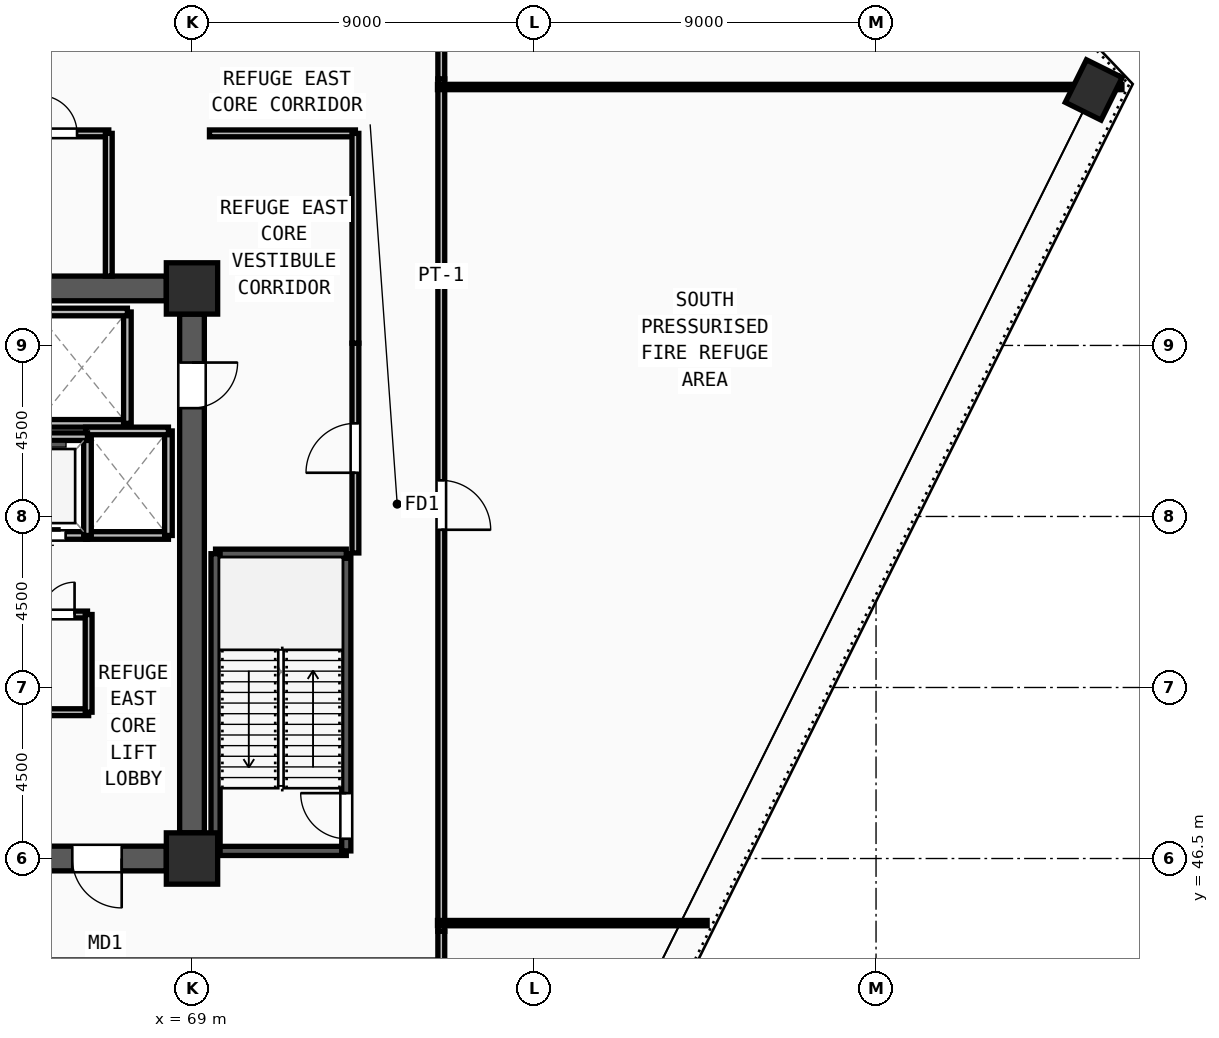
"""IFC4 building model, lengths in metres.
Left out: names, types, materials, properties, quantities, classifications, styles, units other than length and angle.
Written with IfcOpenShell. Run it as: python <this file> out.ifc"""

import sys

from ifc_helpers import new_model, si_unit, direction, frame, frame_2d, origin, origin_2d, place, context, subcontext, project, spatial, rectangle, extrude, source, transform, mapped, element, fill, save


model = new_model("IFC4")
c1 = context("Model", 3, precision=1e-05, world=origin(), true_north=direction((0.0, 1.0)))
c2 = subcontext(c1, "Body", "Model", "MODEL_VIEW")
j1 = project(units=[si_unit("LENGTHUNIT", "METRE"), si_unit("PLANEANGLEUNIT", "RADIAN")], contexts=[c1])
p1 = place(None, origin())
s1 = spatial("IfcSite", under=j1, at=p1, CompositionType="ELEMENT")
p2 = place(p1, origin())
s2 = spatial("IfcBuilding", under=s1, at=p2, CompositionType="ELEMENT")
p3 = place(p2, frame((0.0, 0.0, 231.75)))
s3 = spatial("IfcBuildingStorey", under=s2, at=p3, CompositionType="ELEMENT", Elevation=231.75)
m1 = source(origin(), c2, "Body", "SweptSolid", [
    extrude(rectangle(XDim=1.35, YDim=1.35, at=origin_2d()), origin(), (0.0, 0.0, 1.0), 4.5),
])
for number, where, z_axis, x_axis in (
    (1, (69.0, 46.5, 0.0), (0.0, 0.0, 1.0), (1.0, 0.0, 0.0)),
    (2, (69.0, 61.5, 0.0), (0.0, 0.0, 1.0), (1.0, 0.0, 0.0)),
):
    element("IfcColumn", number, at=place(p3, frame(where, z_axis=z_axis, x_axis=x_axis)), inside=s3, PredefinedType="COLUMN", context=c2, shape_type="MappedRepresentation", body=[
        mapped(m1, transform((0.0, 0.0, 0.0), x_axis=(1.0, 0.0, 0.0), y_axis=(0.0, 1.0, 0.0), z_axis=(0.0, 0.0, 1.0), scale=1.0)),
    ])
m2 = source(origin(), c2, "Body", "SweptSolid", [
    extrude(rectangle(XDim=1.25, YDim=1.05, at=origin_2d()), origin(), (0.0, 0.0, 1.0), 4.5),
])
p4 = place(p3, frame((92.729, 66.723, 0.0), z_axis=(0.0, 0.0, 1.0), x_axis=(0.44447884122, 0.895789350075, 0.0)))
e3 = element("IfcColumn", 3, at=p4, inside=s3, PredefinedType="COLUMN", context=c2, shape_type="MappedRepresentation", body=[
    mapped(m2, transform((0.0, 0.0, 0.0), x_axis=(1.0, 0.0, 0.0), y_axis=(0.0, 1.0, 0.0), z_axis=(0.0, 0.0, 1.0), scale=1.0)),
])
p5 = place(p3, frame((60.675, 61.5, 0.0), z_axis=(0.0, 0.0, 1.0), x_axis=(1.0, 0.0, 0.0)))
e4 = element("IfcWall", 4, at=p5, inside=s3, PredefinedType="SHEAR", context=c2, shape_type="SweptSolid", body=[
    extrude(rectangle(XDim=7.65, YDim=0.65, at=frame_2d((3.825, 0.0))), origin(), (0.0, 0.0, 1.0), 4.32),
])
p6 = place(p3, frame((69.0, 60.825, 0.0), z_axis=(0.0, 0.0, 1.0), x_axis=(0.0, -1.0, 0.0)))
e5 = element("IfcWall", 5, at=p6, inside=s3, PredefinedType="SHEAR", context=c2, shape_type="SweptSolid", body=[
    extrude(rectangle(XDim=13.65, YDim=0.65, at=frame_2d((6.825, 0.0))), origin(), (0.0, 0.0, 1.0), 4.32),
])
m3 = source(origin(), c2, "Body", "SweptSolid", [
    extrude(rectangle(XDim=1.2, YDim=2.2, at=frame_2d((0.6, 1.1))), frame((0.0, 0.335, 0.0), z_axis=(0.0, -1.0, 0.0), x_axis=(1.0, 0.0, 0.0)), (0.0, 0.0, 1.0), 0.67),
])
p7 = place(p6, frame((1.275, 0.0, 0.0)))
e6 = element("IfcOpeningElement", 6, at=p7, cuts=e5, PredefinedType="OPENING", context=c2, shape_type="MappedRepresentation", body=[
    mapped(m3, transform((0.0, 0.0, 0.0), x_axis=(1.0, 0.0, 0.0), y_axis=(0.0, 1.0, 0.0), z_axis=(0.0, 0.0, 1.0), scale=1.0)),
])
p8 = place(p3, frame((68.325, 46.5, 0.0), z_axis=(0.0, 0.0, 1.0), x_axis=(-1.0, 0.0, 0.0)))
e7 = element("IfcWall", 7, at=p8, inside=s3, PredefinedType="SHEAR", context=c2, shape_type="SweptSolid", body=[
    extrude(rectangle(XDim=7.65, YDim=0.65, at=frame_2d((3.825, 0.0))), origin(), (0.0, 0.0, 1.0), 4.32),
])
m4 = source(origin(), c2, "Body", "SweptSolid", [
    extrude(rectangle(XDim=1.3, YDim=2.2, at=frame_2d((0.65, 1.1))), frame((0.0, 0.335, 0.0), z_axis=(0.0, -1.0, 0.0), x_axis=(1.0, 0.0, 0.0)), (0.0, 0.0, 1.0), 0.67),
])
p9 = place(p8, frame((1.175, 0.0, 0.0)))
e8 = element("IfcOpeningElement", 8, at=p9, cuts=e7, PredefinedType="OPENING", context=c2, shape_type="MappedRepresentation", body=[
    mapped(m4, transform((0.0, 0.0, 0.0), x_axis=(1.0, 0.0, 0.0), y_axis=(0.0, 1.0, 0.0), z_axis=(0.0, 0.0, 1.0), scale=1.0)),
])
p10 = place(p3, frame((69.62, 46.7, 0.0), z_axis=(0.0, 0.0, 1.0), x_axis=(1.0, 0.0, 0.0)))
e9 = element("IfcWall", 9, at=p10, inside=s3, PredefinedType="SOLIDWALL", context=c2, shape_type="SweptSolid", body=[
    extrude(rectangle(XDim=3.44, YDim=0.24, at=frame_2d((1.72, 0.0))), origin(), (0.0, 0.0, 1.0), 4.32),
])
p11 = place(p3, frame((73.06, 46.7, 0.0), z_axis=(0.0, 0.0, 1.0), x_axis=(0.0, 1.0, 0.0)))
e10 = element("IfcWall", 10, at=p11, inside=s3, PredefinedType="SOLIDWALL", context=c2, shape_type="SweptSolid", body=[
    extrude(rectangle(XDim=7.82, YDim=0.24, at=frame_2d((3.91, 0.0))), origin(), (0.0, 0.0, 1.0), 4.32),
])
m5 = source(origin(), c2, "Body", "SweptSolid", [
    extrude(rectangle(XDim=1.2, YDim=2.2, at=frame_2d((0.6, 1.1))), frame((0.0, 0.13, 0.0), z_axis=(0.0, -1.0, 0.0), x_axis=(1.0, 0.0, 0.0)), (0.0, 0.0, 1.0), 0.26),
])
p12 = place(p11, frame((0.32, 0.0, 0.0)))
e11 = element("IfcOpeningElement", 11, at=p12, cuts=e10, PredefinedType="OPENING", context=c2, shape_type="MappedRepresentation", body=[
    mapped(m5, transform((0.0, 0.0, 0.0), x_axis=(1.0, 0.0, 0.0), y_axis=(0.0, 1.0, 0.0), z_axis=(0.0, 0.0, 1.0), scale=1.0)),
])
p13 = place(p3, frame((73.06, 54.52, 0.0), z_axis=(0.0, 0.0, 1.0), x_axis=(-1.0, 0.0, 0.0)))
e12 = element("IfcWall", 12, at=p13, inside=s3, PredefinedType="SOLIDWALL", context=c2, shape_type="SweptSolid", body=[
    extrude(rectangle(XDim=3.44, YDim=0.24, at=frame_2d((1.72, 0.0))), origin(), (0.0, 0.0, 1.0), 4.32),
])
p14 = place(p3, frame((69.62, 54.52, 0.0), z_axis=(0.0, 0.0, 1.0), x_axis=(0.0, -1.0, 0.0)))
e13 = element("IfcWall", 13, at=p14, inside=s3, PredefinedType="SOLIDWALL", context=c2, shape_type="SweptSolid", body=[
    extrude(rectangle(XDim=7.82, YDim=0.24, at=frame_2d((3.91, 0.0))), origin(), (0.0, 0.0, 1.0), 4.32),
])
p15 = place(p3, frame((64.9, 57.95, 0.0), z_axis=(0.0, 0.0, 1.0), x_axis=(1.0, 0.0, 0.0)))
e14 = element("IfcWall", 14, at=p15, inside=s3, PredefinedType="SOLIDWALL", context=c2, shape_type="SweptSolid", body=[
    extrude(rectangle(XDim=2.4, YDim=0.2, at=frame_2d((1.2, 0.0))), origin(), (0.0, 0.0, 1.0), 4.32),
])
p16 = place(p3, frame((67.3, 57.95, 0.0), z_axis=(0.0, 0.0, 1.0), x_axis=(0.0, 1.0, 0.0)))
e15 = element("IfcWall", 15, at=p16, inside=s3, PredefinedType="SOLIDWALL", context=c2, shape_type="SweptSolid", body=[
    extrude(rectangle(XDim=2.93, YDim=0.2, at=frame_2d((1.465, 0.0))), origin(), (0.0, 0.0, 1.0), 4.32),
])
p17 = place(p3, frame((67.3, 60.88, 0.0), z_axis=(0.0, 0.0, 1.0), x_axis=(-1.0, 0.0, 0.0)))
e16 = element("IfcWall", 16, at=p17, inside=s3, PredefinedType="SOLIDWALL", context=c2, shape_type="SweptSolid", body=[
    extrude(rectangle(XDim=2.4, YDim=0.2, at=frame_2d((1.2, 0.0))), origin(), (0.0, 0.0, 1.0), 4.32),
])
p18 = place(p3, frame((66.2, 55.0, 0.0), z_axis=(0.0, 0.0, 1.0), x_axis=(1.0, 0.0, 0.0)))
e17 = element("IfcWall", 17, at=p18, inside=s3, PredefinedType="SOLIDWALL", context=c2, shape_type="SweptSolid", body=[
    extrude(rectangle(XDim=2.18, YDim=0.2, at=frame_2d((1.09, 0.0))), origin(), (0.0, 0.0, 1.0), 4.32),
])
p19 = place(p3, frame((68.38, 55.0, 0.0), z_axis=(0.0, 0.0, 1.0), x_axis=(0.0, 1.0, 0.0)))
e18 = element("IfcWall", 18, at=p19, inside=s3, PredefinedType="SOLIDWALL", context=c2, shape_type="SweptSolid", body=[
    extrude(rectangle(XDim=2.75, YDim=0.2, at=frame_2d((1.375, 0.0))), origin(), (0.0, 0.0, 1.0), 4.32),
])
p20 = place(p3, frame((68.38, 57.75, 0.0), z_axis=(0.0, 0.0, 1.0), x_axis=(-1.0, 0.0, 0.0)))
e19 = element("IfcWall", 19, at=p20, inside=s3, PredefinedType="SOLIDWALL", context=c2, shape_type="SweptSolid", body=[
    extrude(rectangle(XDim=2.18, YDim=0.2, at=frame_2d((1.09, 0.0))), origin(), (0.0, 0.0, 1.0), 4.32),
])
p21 = place(p3, frame((64.0, 55.0, 0.0), z_axis=(0.0, 0.0, 1.0), x_axis=(1.0, 0.0, 0.0)))
e20 = element("IfcWall", 20, at=p21, inside=s3, PredefinedType="SOLIDWALL", context=c2, shape_type="SweptSolid", body=[
    extrude(rectangle(XDim=2.25, YDim=0.2, at=frame_2d((1.125, 0.0))), origin(), (0.0, 0.0, 1.0), 4.32),
])
m6 = source(origin(), c2, "Body", "SweptSolid", [
    extrude(rectangle(XDim=1.1, YDim=2.2, at=frame_2d((0.55, 1.1))), frame((0.0, 0.11, 0.0), z_axis=(0.0, -1.0, 0.0), x_axis=(1.0, 0.0, 0.0)), (0.0, 0.0, 1.0), 0.22),
])
p22 = place(p21, frame((0.575, 0.0, 0.0)))
e21 = element("IfcOpeningElement", 21, at=p22, cuts=e20, PredefinedType="OPENING", context=c2, shape_type="MappedRepresentation", body=[
    mapped(m6, transform((0.0, 0.0, 0.0), x_axis=(1.0, 0.0, 0.0), y_axis=(0.0, 1.0, 0.0), z_axis=(0.0, 0.0, 1.0), scale=1.0)),
])
p23 = place(p3, frame((66.25, 55.0, 0.0), z_axis=(0.0, 0.0, 1.0), x_axis=(0.0, 1.0, 0.0)))
e22 = element("IfcWall", 22, at=p23, inside=s3, PredefinedType="SOLIDWALL", context=c2, shape_type="SweptSolid", body=[
    extrude(rectangle(XDim=2.6, YDim=0.2, at=frame_2d((1.3, 0.0))), origin(), (0.0, 0.0, 1.0), 4.32),
])
p24 = place(p3, frame((66.25, 57.6, 0.0), z_axis=(0.0, 0.0, 1.0), x_axis=(-1.0, 0.0, 0.0)))
e23 = element("IfcWall", 23, at=p24, inside=s3, PredefinedType="SOLIDWALL", context=c2, shape_type="SweptSolid", body=[
    extrude(rectangle(XDim=2.25, YDim=0.2, at=frame_2d((1.125, 0.0))), origin(), (0.0, 0.0, 1.0), 4.32),
])
p25 = place(p3, frame((64.72, 52.92, 0.0), z_axis=(0.0, 0.0, 1.0), x_axis=(1.0, 0.0, 0.0)))
e24 = element("IfcWall", 24, at=p25, inside=s3, PredefinedType="PARTITIONING", context=c2, shape_type="SweptSolid", body=[
    extrude(rectangle(XDim=1.53, YDim=0.18, at=frame_2d((0.765, 0.0))), origin(), (0.0, 0.0, 1.0), 4.32),
])
m7 = source(origin(), c2, "Body", "SweptSolid", [
    extrude(rectangle(XDim=0.85, YDim=2.1, at=frame_2d((0.425, 1.05))), frame((0.0, 0.1, 0.0), z_axis=(0.0, -1.0, 0.0), x_axis=(1.0, 0.0, 0.0)), (0.0, 0.0, 1.0), 0.2),
])
p26 = place(p25, frame((0.34, 0.0, 0.0)))
e25 = element("IfcOpeningElement", 25, at=p26, cuts=e24, PredefinedType="OPENING", context=c2, shape_type="MappedRepresentation", body=[
    mapped(m7, transform((0.0, 0.0, 0.0), x_axis=(1.0, 0.0, 0.0), y_axis=(0.0, 1.0, 0.0), z_axis=(0.0, 0.0, 1.0), scale=1.0)),
])
p27 = place(p3, frame((64.14, 65.58, 0.0), z_axis=(0.0, 0.0, 1.0), x_axis=(1.0, 0.0, 0.0)))
e26 = element("IfcWall", 26, at=p27, inside=s3, PredefinedType="PARTITIONING", context=c2, shape_type="SweptSolid", body=[
    extrude(rectangle(XDim=2.67, YDim=0.18, at=frame_2d((1.335, 0.0))), origin(), (0.0, 0.0, 1.0), 4.32),
])
m8 = source(origin(), c2, "Body", "SweptSolid", [
    extrude(rectangle(XDim=1.0, YDim=2.2, at=frame_2d((0.5, 1.1))), frame((0.0, 0.1, 0.0), z_axis=(0.0, -1.0, 0.0), x_axis=(1.0, 0.0, 0.0)), (0.0, 0.0, 1.0), 0.2),
])
p28 = place(p27, frame((0.835, 0.0, 0.0)))
e27 = element("IfcOpeningElement", 27, at=p28, cuts=e26, PredefinedType="OPENING", context=c2, shape_type="MappedRepresentation", body=[
    mapped(m8, transform((0.0, 0.0, 0.0), x_axis=(1.0, 0.0, 0.0), y_axis=(0.0, 1.0, 0.0), z_axis=(0.0, 0.0, 1.0), scale=1.0)),
])
p29 = place(p3, frame((73.3, 54.54, 0.0), z_axis=(0.0, 0.0, 1.0), x_axis=(0.0, 1.0, 0.0)))
e28 = element("IfcWall", 28, at=p29, inside=s3, PredefinedType="PARTITIONING", context=c2, shape_type="SweptSolid", body=[
    extrude(rectangle(XDim=5.52, YDim=0.18, at=frame_2d((2.76, 0.0))), origin(), (0.0, 0.0, 1.0), 4.32),
])
m9 = source(origin(), c2, "Body", "SweptSolid", [
    extrude(rectangle(XDim=1.3, YDim=2.2, at=frame_2d((0.65, 1.1))), frame((0.0, 0.1, 0.0), z_axis=(0.0, -1.0, 0.0), x_axis=(1.0, 0.0, 0.0)), (0.0, 0.0, 1.0), 0.2),
])
p30 = place(p29, frame((2.11, 0.0, 0.0)))
e29 = element("IfcOpeningElement", 29, at=p30, cuts=e28, PredefinedType="OPENING", context=c2, shape_type="MappedRepresentation", body=[
    mapped(m9, transform((0.0, 0.0, 0.0), x_axis=(1.0, 0.0, 0.0), y_axis=(0.0, 1.0, 0.0), z_axis=(0.0, 0.0, 1.0), scale=1.0)),
])
p31 = place(p3, frame((75.56, 67.015, 0.0), z_axis=(0.0, 0.0, 1.0), x_axis=(0.0, -1.0, 0.0)))
e30 = element("IfcWall", 30, at=p31, inside=s3, PredefinedType="PARTITIONING", context=c2, shape_type="SweptSolid", body=[
    extrude(rectangle(XDim=22.43, YDim=0.18, at=frame_2d((11.215, 0.0))), origin(), (0.0, 0.0, 1.0), 4.32),
])
p32 = place(p31, frame((10.565, 0.0, 0.0)))
e31 = element("IfcOpeningElement", 31, at=p32, cuts=e30, PredefinedType="OPENING", context=c2, shape_type="MappedRepresentation", body=[
    mapped(m9, transform((0.0, 0.0, 0.0), x_axis=(1.0, 0.0, 0.0), y_axis=(0.0, 1.0, 0.0), z_axis=(0.0, 0.0, 1.0), scale=1.0)),
])
p33 = place(p3, frame((64.69, 50.35, 0.0), z_axis=(0.0, 0.0, 1.0), x_axis=(1.0, 0.0, 0.0)))
e32 = element("IfcWall", 32, at=p33, inside=s3, PredefinedType="PARTITIONING", context=c2, shape_type="SweptSolid", body=[
    extrude(rectangle(XDim=1.59, YDim=0.18, at=frame_2d((0.795, 0.0))), origin(), (0.0, 0.0, 1.0), 4.32),
])
p34 = place(p3, frame((66.28, 50.35, 0.0), z_axis=(0.0, 0.0, 1.0), x_axis=(0.0, 1.0, 0.0)))
e33 = element("IfcWall", 33, at=p34, inside=s3, PredefinedType="PARTITIONING", context=c2, shape_type="SweptSolid", body=[
    extrude(rectangle(XDim=2.57, YDim=0.18, at=frame_2d((1.285, 0.0))), origin(), (0.0, 0.0, 1.0), 4.32),
])
p35 = place(p3, frame((66.81, 61.825, 0.0), z_axis=(0.0, 0.0, 1.0), x_axis=(0.0, 1.0, 0.0)))
e34 = element("IfcWall", 34, at=p35, inside=s3, PredefinedType="PARTITIONING", context=c2, shape_type="SweptSolid", body=[
    extrude(rectangle(XDim=3.755, YDim=0.18, at=frame_2d((1.877, 0.0))), origin(), (0.0, 0.0, 1.0), 4.32),
])
p36 = place(p3, frame((69.46, 65.58, 0.0), z_axis=(0.0, 0.0, 1.0), x_axis=(1.0, 0.0, 0.0)))
e35 = element("IfcWall", 35, at=p36, inside=s3, PredefinedType="PARTITIONING", context=c2, shape_type="SweptSolid", body=[
    extrude(rectangle(XDim=3.84, YDim=0.18, at=frame_2d((1.92, 0.0))), origin(), (0.0, 0.0, 1.0), 4.32),
])
p37 = place(p3, frame((73.3, 60.06, 0.0), z_axis=(0.0, 0.0, 1.0), x_axis=(0.0, 1.0, 0.0)))
e36 = element("IfcWall", 36, at=p37, inside=s3, PredefinedType="PARTITIONING", context=c2, shape_type="SweptSolid", body=[
    extrude(rectangle(XDim=5.52, YDim=0.18, at=frame_2d((2.76, 0.0))), origin(), (0.0, 0.0, 1.0), 4.32),
])
p38 = place(p3, frame((75.56, 67.98, 0.0), z_axis=(0.0, 0.0, 1.0), x_axis=(0.0, -1.0, 0.0)))
e37 = element("IfcWall", 37, at=p38, inside=s3, PredefinedType="PARTITIONING", context=c2, shape_type="SweptSolid", body=[
    extrude(rectangle(XDim=0.965, YDim=0.18, at=frame_2d((0.482, 0.0))), origin(), (0.0, 0.0, 1.0), 4.32),
])
p39 = place(p3, frame((75.56, 44.585, 0.0), z_axis=(0.0, 0.0, 1.0), x_axis=(0.0, -1.0, 0.0)))
e38 = element("IfcWall", 38, at=p39, inside=s3, PredefinedType="PARTITIONING", context=c2, shape_type="SweptSolid", body=[
    extrude(rectangle(XDim=0.915, YDim=0.18, at=frame_2d((0.458, 0.0))), origin(), (0.0, 0.0, 1.0), 4.32),
])
p40 = place(p3, frame((75.46, 44.8, 0.0), z_axis=(0.0, 0.0, 1.0), x_axis=(1.0, 0.0, 0.0)))
e39 = element("IfcWall", 39, at=p40, inside=s3, PredefinedType="PARTITIONING", context=c2, shape_type="SweptSolid", body=[
    extrude(rectangle(XDim=7.095, YDim=0.14, at=frame_2d((3.547, 0.0))), origin(), (0.0, 0.0, 1.0), 4.32),
])
p41 = place(p3, frame((75.46, 66.8, 0.0), z_axis=(0.0, 0.0, 1.0), x_axis=(1.0, 0.0, 0.0)))
e40 = element("IfcWall", 40, at=p41, inside=s3, PredefinedType="PARTITIONING", context=c2, shape_type="SweptSolid", body=[
    extrude(rectangle(XDim=18.011, YDim=0.14, at=frame_2d((9.005, 0.0))), origin(), (0.0, 0.0, 1.0), 4.32),
])
m10 = source(origin(), c2, "Body", "SweptSolid", [
    extrude(rectangle(XDim=1.3, YDim=2.2, at=frame_2d((0.65, 1.1))), frame((0.0, 0.025, 0.0), z_axis=(0.0, -1.0, 0.0), x_axis=(1.0, 0.0, 0.0)), (0.0, 0.0, 1.0), 0.05),
])
p42 = place(p9, origin())
e41 = element("IfcDoor", 41, at=p42, inside=s3, OperationType="SINGLE_SWING_LEFT", PredefinedType="DOOR", context=c2, shape_type="MappedRepresentation", body=[
    mapped(m10, transform((0.0, 0.0, 0.0), x_axis=(1.0, 0.0, 0.0), y_axis=(0.0, 1.0, 0.0), z_axis=(0.0, 0.0, 1.0), scale=1.0)),
])
fill(e8, e41)
m11 = source(origin(), c2, "Body", "SweptSolid", [
    extrude(rectangle(XDim=1.2, YDim=2.2, at=frame_2d((0.6, 1.1))), frame((0.0, 0.025, 0.0), z_axis=(0.0, -1.0, 0.0), x_axis=(1.0, 0.0, 0.0)), (0.0, 0.0, 1.0), 0.05),
])
p43 = place(p7, origin())
e42 = element("IfcDoor", 42, at=p43, inside=s3, OperationType="SINGLE_SWING_LEFT", PredefinedType="DOOR", context=c2, shape_type="MappedRepresentation", body=[
    mapped(m11, transform((0.0, 0.0, 0.0), x_axis=(1.0, 0.0, 0.0), y_axis=(0.0, 1.0, 0.0), z_axis=(0.0, 0.0, 1.0), scale=1.0)),
])
fill(e6, e42)
p44 = place(p12, origin())
e43 = element("IfcDoor", 43, at=p44, inside=s3, OperationType="SINGLE_SWING_RIGHT", PredefinedType="DOOR", context=c2, shape_type="MappedRepresentation", body=[
    mapped(m11, transform((0.0, 0.0, 0.0), x_axis=(1.0, 0.0, 0.0), y_axis=(0.0, 1.0, 0.0), z_axis=(0.0, 0.0, 1.0), scale=1.0)),
])
fill(e11, e43)
m12 = source(origin(), c2, "Body", "SweptSolid", [
    extrude(rectangle(XDim=1.1, YDim=2.2, at=frame_2d((0.55, 1.1))), frame((0.0, 0.025, 0.0), z_axis=(0.0, -1.0, 0.0), x_axis=(1.0, 0.0, 0.0)), (0.0, 0.0, 1.0), 0.05),
])
p45 = place(p22, origin())
e44 = element("IfcDoor", 44, at=p45, inside=s3, OperationType="SLIDING_TO_LEFT", PredefinedType="DOOR", context=c2, shape_type="MappedRepresentation", body=[
    mapped(m12, transform((0.0, 0.0, 0.0), x_axis=(1.0, 0.0, 0.0), y_axis=(0.0, 1.0, 0.0), z_axis=(0.0, 0.0, 1.0), scale=1.0)),
])
fill(e21, e44)
m13 = source(origin(), c2, "Body", "SweptSolid", [
    extrude(rectangle(XDim=0.85, YDim=2.1, at=frame_2d((0.425, 1.05))), frame((0.0, 0.025, 0.0), z_axis=(0.0, -1.0, 0.0), x_axis=(1.0, 0.0, 0.0)), (0.0, 0.0, 1.0), 0.05),
])
p46 = place(p26, origin())
e45 = element("IfcDoor", 45, at=p46, inside=s3, OperationType="SINGLE_SWING_RIGHT", PredefinedType="DOOR", context=c2, shape_type="MappedRepresentation", body=[
    mapped(m13, transform((0.0, 0.0, 0.0), x_axis=(1.0, 0.0, 0.0), y_axis=(0.0, 1.0, 0.0), z_axis=(0.0, 0.0, 1.0), scale=1.0)),
])
fill(e25, e45)
m14 = source(origin(), c2, "Body", "SweptSolid", [
    extrude(rectangle(XDim=1.0, YDim=2.2, at=frame_2d((0.5, 1.1))), frame((0.0, 0.025, 0.0), z_axis=(0.0, -1.0, 0.0), x_axis=(1.0, 0.0, 0.0)), (0.0, 0.0, 1.0), 0.05),
])
p47 = place(p28, origin())
e46 = element("IfcDoor", 46, at=p47, inside=s3, OperationType="SINGLE_SWING_LEFT", PredefinedType="DOOR", context=c2, shape_type="MappedRepresentation", body=[
    mapped(m14, transform((0.0, 0.0, 0.0), x_axis=(1.0, 0.0, 0.0), y_axis=(0.0, 1.0, 0.0), z_axis=(0.0, 0.0, 1.0), scale=1.0)),
])
fill(e27, e46)
p48 = place(p30, origin())
e47 = element("IfcDoor", 47, at=p48, inside=s3, OperationType="SINGLE_SWING_LEFT", PredefinedType="DOOR", context=c2, shape_type="MappedRepresentation", body=[
    mapped(m10, transform((0.0, 0.0, 0.0), x_axis=(1.0, 0.0, 0.0), y_axis=(0.0, 1.0, 0.0), z_axis=(0.0, 0.0, 1.0), scale=1.0)),
])
fill(e29, e47)
p49 = place(p32, origin())
e48 = element("IfcDoor", 48, at=p49, inside=s3, OperationType="SINGLE_SWING_RIGHT", PredefinedType="DOOR", context=c2, shape_type="MappedRepresentation", body=[
    mapped(m10, transform((0.0, 0.0, 0.0), x_axis=(1.0, 0.0, 0.0), y_axis=(0.0, 1.0, 0.0), z_axis=(0.0, 0.0, 1.0), scale=1.0)),
])
fill(e31, e48)
save(model, sys.argv[1])
